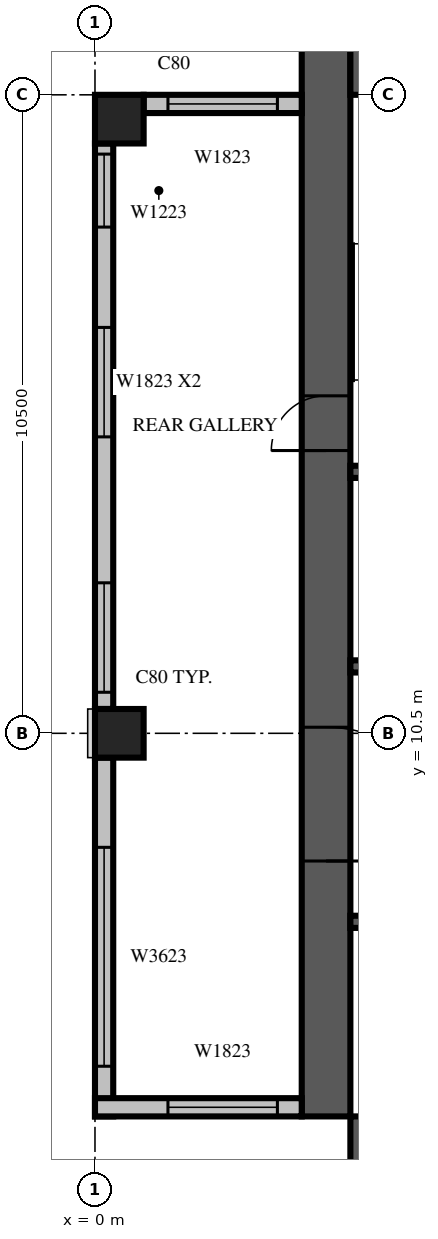
"""IFC4 building model, lengths in metres.
Left out: names, types, materials, properties, quantities, classifications, styles, units other than length and angle.
Written with IfcOpenShell. Run it as: python <this file> out.ifc"""

import sys

from ifc_helpers import new_model, si_unit, direction, frame, frame_2d, origin, origin_2d, place, context, subcontext, project, spatial, rectangle, extrude, source, transform, mapped, element, fill, save


model = new_model("IFC4")
c1 = context("Model", 3, precision=1e-05, world=origin(), true_north=direction((0.0, 1.0)))
c2 = subcontext(c1, "Body", "Model", "MODEL_VIEW")
j1 = project(units=[si_unit("LENGTHUNIT", "METRE"), si_unit("PLANEANGLEUNIT", "RADIAN")], contexts=[c1])
p1 = place(None, origin())
s1 = spatial("IfcSite", under=j1, at=p1, CompositionType="ELEMENT")
p2 = place(p1, origin())
s2 = spatial("IfcBuilding", under=s1, at=p2, CompositionType="ELEMENT")
p3 = place(p2, frame((0.0, 0.0, 257.6)))
s3 = spatial("IfcBuildingStorey", under=s2, at=p3, CompositionType="ELEMENT", Elevation=257.6)
m1 = source(origin(), c2, "Body", "SweptSolid", [
    extrude(rectangle(XDim=0.8, YDim=0.8, at=origin_2d()), origin(), (0.0, 0.0, 1.0), 3.8),
])
for number, where, z_axis, x_axis in (
    (1, (0.4, 10.5, 0.0), (0.0, 0.0, 1.0), (1.0, 0.0, 0.0)),
    (2, (0.4, 20.6, 0.0), (0.0, 0.0, 1.0), (1.0, 0.0, 0.0)),
):
    element("IfcColumn", number, at=place(p3, frame(where, z_axis=z_axis, x_axis=x_axis)), inside=s3, PredefinedType="COLUMN", context=c2, shape_type="MappedRepresentation", body=[
        mapped(m1, transform((0.0, 0.0, 0.0), scale=1.0)),
    ])
m2 = source(origin(), c2, "Body", "SweptSolid", [
    extrude(rectangle(XDim=17.6, YDim=0.8, at=frame_2d((8.8, 0.0))), origin(), (0.0, 0.0, 1.0), 3.8),
])
p4 = place(p3, frame((3.8, 4.2, 0.0), z_axis=(0.0, 0.0, 1.0), x_axis=(0.0, 1.0, 0.0)))
e3 = element("IfcWall", 3, at=p4, inside=s3, PredefinedType="SHEAR", context=c2, shape_type="MappedRepresentation", body=[
    mapped(m2, transform((0.0, 0.0, 0.0), scale=1.0)),
])
m3 = source(origin(), c2, "Body", "SweptSolid", [
    extrude(rectangle(XDim=2.2, YDim=2.1, at=frame_2d((1.1, 1.05))), frame((0.0, 0.41, 0.0), z_axis=(0.0, -1.0, 0.0), x_axis=(1.0, 0.0, 0.0)), (0.0, 0.0, 1.0), 0.82),
])
p5 = place(p4, frame((4.2, 0.0, 0.0)))
e4 = element("IfcOpeningElement", 4, at=p5, cuts=e3, PredefinedType="OPENING", context=c2, shape_type="MappedRepresentation", body=[
    mapped(m3, transform((0.0, 0.0, 0.0), scale=1.0)),
])
m4 = source(origin(), c2, "Body", "SweptSolid", [
    extrude(rectangle(XDim=0.9, YDim=2.1, at=frame_2d((0.45, 1.05))), frame((0.0, 0.41, 0.0), z_axis=(0.0, -1.0, 0.0), x_axis=(1.0, 0.0, 0.0)), (0.0, 0.0, 1.0), 0.82),
])
p6 = place(p4, frame((10.95, 0.0, 0.0)))
e5 = element("IfcOpeningElement", 5, at=p6, cuts=e3, PredefinedType="OPENING", context=c2, shape_type="MappedRepresentation", body=[
    mapped(m4, transform((0.0, 0.0, 0.0), scale=1.0)),
])
p7 = place(p3, frame((4.2, 3.8, 0.0), z_axis=(0.0, 0.0, 1.0), x_axis=(1.0, 0.0, 0.0)))
e6 = element("IfcWall", 6, at=p7, inside=s3, PredefinedType="SHEAR", context=c2, shape_type="MappedRepresentation", body=[
    mapped(m2, transform((0.0, 0.0, 0.0), scale=1.0)),
])
p8 = place(p7, frame((11.55, 0.0, 0.0)))
e7 = element("IfcOpeningElement", 7, at=p8, cuts=e6, PredefinedType="OPENING", context=c2, shape_type="MappedRepresentation", body=[
    mapped(m4, transform((0.0, 0.0, 0.0), scale=1.0)),
])
m5 = source(origin(), c2, "Body", "SweptSolid", [
    extrude(rectangle(XDim=16.8, YDim=0.8, at=frame_2d((8.4, 0.0))), origin(), (0.0, 0.0, 1.0), 3.8),
])
p9 = place(p3, frame((4.2, 21.4, 0.0), z_axis=(0.0, 0.0, 1.0), x_axis=(1.0, 0.0, 0.0)))
e8 = element("IfcWall", 8, at=p9, inside=s3, PredefinedType="SHEAR", context=c2, shape_type="MappedRepresentation", body=[
    mapped(m5, transform((0.0, 0.0, 0.0), scale=1.0)),
])
m6 = source(origin(), c2, "Body", "SweptSolid", [
    extrude(rectangle(XDim=1.2, YDim=2.1, at=frame_2d((0.6, 1.05))), frame((0.0, 0.41, 0.0), z_axis=(0.0, -1.0, 0.0), x_axis=(1.0, 0.0, 0.0)), (0.0, 0.0, 1.0), 0.82),
])
p10 = place(p9, frame((6.2, 0.0, 0.0)))
e9 = element("IfcOpeningElement", 9, at=p10, cuts=e8, PredefinedType="OPENING", context=c2, shape_type="MappedRepresentation", body=[
    mapped(m6, transform((0.0, 0.0, 0.0), scale=1.0)),
])
m7 = source(origin(), c2, "Body", "SweptSolid", [
    extrude(rectangle(XDim=2.6, YDim=0.3, at=frame_2d((1.3, 0.0))), origin(), (0.0, 0.0, 1.0), 3.4),
])
p11 = place(p3, frame((3.4, 20.85, 0.0), z_axis=(0.0, 0.0, 1.0), x_axis=(-1.0, 0.0, 0.0)))
e10 = element("IfcWall", 10, at=p11, inside=s3, PredefinedType="STANDARD", context=c2, shape_type="MappedRepresentation", body=[
    mapped(m7, transform((0.0, 0.0, 0.0), scale=1.0)),
])
m8 = source(origin(), c2, "Body", "SweptSolid", [
    extrude(rectangle(XDim=1.8, YDim=2.3, at=frame_2d((0.9, 1.15))), frame((0.0, 0.16, 0.0), z_axis=(0.0, -1.0, 0.0), x_axis=(1.0, 0.0, 0.0)), (0.0, 0.0, 1.0), 0.32),
])
p12 = place(p11, frame((0.4, 0.0, 0.6)))
e11 = element("IfcOpeningElement", 11, at=p12, cuts=e10, PredefinedType="OPENING", context=c2, shape_type="MappedRepresentation", body=[
    mapped(m8, transform((0.0, 0.0, 0.0), scale=1.0)),
])
m9 = source(origin(), c2, "Body", "SweptSolid", [
    extrude(rectangle(XDim=9.3, YDim=0.3, at=frame_2d((4.65, 0.0))), origin(), (0.0, 0.0, 1.0), 3.4),
])
p13 = place(p3, frame((0.15, 20.2, 0.0), z_axis=(0.0, 0.0, 1.0), x_axis=(0.0, -1.0, 0.0)))
e12 = element("IfcWall", 12, at=p13, inside=s3, PredefinedType="STANDARD", context=c2, shape_type="MappedRepresentation", body=[
    mapped(m9, transform((0.0, 0.0, 0.0), scale=1.0)),
])
m10 = source(origin(), c2, "Body", "SweptSolid", [
    extrude(rectangle(XDim=1.2, YDim=2.3, at=frame_2d((0.6, 1.15))), frame((0.0, 0.16, 0.0), z_axis=(0.0, -1.0, 0.0), x_axis=(1.0, 0.0, 0.0)), (0.0, 0.0, 1.0), 0.32),
])
p14 = place(p13, frame((0.175, 0.0, 0.6)))
e13 = element("IfcOpeningElement", 13, at=p14, cuts=e12, PredefinedType="OPENING", context=c2, shape_type="MappedRepresentation", body=[
    mapped(m10, transform((0.0, 0.0, 0.0), scale=1.0)),
])
p15 = place(p13, frame((3.025, 0.0, 0.6)))
e14 = element("IfcOpeningElement", 14, at=p15, cuts=e12, PredefinedType="OPENING", context=c2, shape_type="MappedRepresentation", body=[
    mapped(m8, transform((0.0, 0.0, 0.0), scale=1.0)),
])
p16 = place(p13, frame((7.225, 0.0, 0.6)))
e15 = element("IfcOpeningElement", 15, at=p16, cuts=e12, PredefinedType="OPENING", context=c2, shape_type="MappedRepresentation", body=[
    mapped(m8, transform((0.0, 0.0, 0.0), scale=1.0)),
])
m11 = source(origin(), c2, "Body", "SweptSolid", [
    extrude(rectangle(XDim=5.9, YDim=0.3, at=frame_2d((2.95, 0.0))), origin(), (0.0, 0.0, 1.0), 3.4),
])
p17 = place(p3, frame((0.15, 10.1, 0.0), z_axis=(0.0, 0.0, 1.0), x_axis=(0.0, -1.0, 0.0)))
e16 = element("IfcWall", 16, at=p17, inside=s3, PredefinedType="STANDARD", context=c2, shape_type="MappedRepresentation", body=[
    mapped(m11, transform((0.0, 0.0, 0.0), scale=1.0)),
])
m12 = source(origin(), c2, "Body", "SweptSolid", [
    extrude(rectangle(XDim=3.6, YDim=2.3, at=frame_2d((1.8, 1.15))), frame((0.0, 0.16, 0.0), z_axis=(0.0, -1.0, 0.0), x_axis=(1.0, 0.0, 0.0)), (0.0, 0.0, 1.0), 0.32),
])
p18 = place(p17, frame((1.475, 0.0, 0.6)))
e17 = element("IfcOpeningElement", 17, at=p18, cuts=e16, PredefinedType="OPENING", context=c2, shape_type="MappedRepresentation", body=[
    mapped(m12, transform((0.0, 0.0, 0.0), scale=1.0)),
])
m13 = source(origin(), c2, "Body", "SweptSolid", [
    extrude(rectangle(XDim=3.4, YDim=0.3, at=frame_2d((1.7, 0.0))), origin(), (0.0, 0.0, 1.0), 3.4),
])
p19 = place(p3, frame((0.0, 4.35, 0.0), z_axis=(0.0, 0.0, 1.0), x_axis=(1.0, 0.0, 0.0)))
e18 = element("IfcWall", 18, at=p19, inside=s3, PredefinedType="STANDARD", context=c2, shape_type="MappedRepresentation", body=[
    mapped(m13, transform((0.0, 0.0, 0.0), scale=1.0)),
])
p20 = place(p19, frame((1.2, 0.0, 0.6)))
e19 = element("IfcOpeningElement", 19, at=p20, cuts=e18, PredefinedType="OPENING", context=c2, shape_type="MappedRepresentation", body=[
    mapped(m8, transform((0.0, 0.0, 0.0), scale=1.0)),
])
m14 = source(origin(), c2, "Body", "SweptSolid", [
    extrude(rectangle(XDim=9.6, YDim=0.2, at=frame_2d((4.8, 0.0))), origin(), (0.0, 0.0, 1.0), 3.8),
])
p21 = place(p3, frame((4.2, 7.4, 0.0), z_axis=(0.0, 0.0, 1.0), x_axis=(1.0, 0.0, 0.0)))
e20 = element("IfcWall", 20, at=p21, inside=s3, PredefinedType="SOLIDWALL", context=c2, shape_type="MappedRepresentation", body=[
    mapped(m14, transform((0.0, 0.0, 0.0), scale=1.0)),
])
m15 = source(origin(), c2, "Body", "SweptSolid", [
    extrude(rectangle(XDim=1.1, YDim=2.1, at=frame_2d((0.55, 1.05))), frame((0.0, 0.11, 0.0), z_axis=(0.0, -1.0, 0.0), x_axis=(1.0, 0.0, 0.0)), (0.0, 0.0, 1.0), 0.22),
])
p22 = place(p21, frame((0.65, 0.0, 0.0)))
e21 = element("IfcOpeningElement", 21, at=p22, cuts=e20, PredefinedType="OPENING", context=c2, shape_type="MappedRepresentation", body=[
    mapped(m15, transform((0.0, 0.0, 0.0), scale=1.0)),
])
p23 = place(p21, frame((3.05, 0.0, 0.0)))
e22 = element("IfcOpeningElement", 22, at=p23, cuts=e20, PredefinedType="OPENING", context=c2, shape_type="MappedRepresentation", body=[
    mapped(m15, transform((0.0, 0.0, 0.0), scale=1.0)),
])
p24 = place(p21, frame((5.45, 0.0, 0.0)))
e23 = element("IfcOpeningElement", 23, at=p24, cuts=e20, PredefinedType="OPENING", context=c2, shape_type="MappedRepresentation", body=[
    mapped(m15, transform((0.0, 0.0, 0.0), scale=1.0)),
])
p25 = place(p21, frame((7.85, 0.0, 0.0)))
e24 = element("IfcOpeningElement", 24, at=p25, cuts=e20, PredefinedType="OPENING", context=c2, shape_type="MappedRepresentation", body=[
    mapped(m15, transform((0.0, 0.0, 0.0), scale=1.0)),
])
m16 = source(origin(), c2, "Body", "SweptSolid", [
    extrude(rectangle(XDim=4.8, YDim=0.2, at=frame_2d((2.4, 0.0))), origin(), (0.0, 0.0, 1.0), 3.8),
])
p26 = place(p3, frame((4.2, 11.6, 0.0), z_axis=(0.0, 0.0, 1.0), x_axis=(1.0, 0.0, 0.0)))
e25 = element("IfcWall", 25, at=p26, inside=s3, PredefinedType="SOLIDWALL", context=c2, shape_type="MappedRepresentation", body=[
    mapped(m16, transform((0.0, 0.0, 0.0), scale=1.0)),
])
p27 = place(p26, frame((0.65, 0.0, 0.0)))
e26 = element("IfcOpeningElement", 26, at=p27, cuts=e25, PredefinedType="OPENING", context=c2, shape_type="MappedRepresentation", body=[
    mapped(m15, transform((0.0, 0.0, 0.0), scale=1.0)),
])
p28 = place(p26, frame((3.05, 0.0, 0.0)))
e27 = element("IfcOpeningElement", 27, at=p28, cuts=e25, PredefinedType="OPENING", context=c2, shape_type="MappedRepresentation", body=[
    mapped(m15, transform((0.0, 0.0, 0.0), scale=1.0)),
])
p29 = place(p3, frame((4.2, 14.8, 0.0), z_axis=(0.0, 0.0, 1.0), x_axis=(1.0, 0.0, 0.0)))
e28 = element("IfcWall", 28, at=p29, inside=s3, PredefinedType="SOLIDWALL", context=c2, shape_type="MappedRepresentation", body=[
    mapped(m16, transform((0.0, 0.0, 0.0), scale=1.0)),
])
m17 = source(origin(), c2, "Body", "SweptSolid", [
    extrude(rectangle(XDim=1.8, YDim=2.3, at=frame_2d((0.9, 1.15))), frame((0.0, 0.03, 0.0), z_axis=(0.0, -1.0, 0.0), x_axis=(1.0, 0.0, 0.0)), (0.0, 0.0, 1.0), 0.06),
])
p30 = place(p12, origin())
e29 = element("IfcWindow", 29, at=p30, inside=s3, PartitioningType="SINGLE_PANEL", PredefinedType="WINDOW", context=c2, shape_type="MappedRepresentation", body=[
    mapped(m17, transform((0.0, 0.0, 0.0), scale=1.0)),
])
fill(e11, e29)
m18 = source(origin(), c2, "Body", "SweptSolid", [
    extrude(rectangle(XDim=1.2, YDim=2.3, at=frame_2d((0.6, 1.15))), frame((0.0, 0.03, 0.0), z_axis=(0.0, -1.0, 0.0), x_axis=(1.0, 0.0, 0.0)), (0.0, 0.0, 1.0), 0.06),
])
p31 = place(p14, origin())
e30 = element("IfcWindow", 30, at=p31, inside=s3, PartitioningType="SINGLE_PANEL", PredefinedType="WINDOW", context=c2, shape_type="MappedRepresentation", body=[
    mapped(m18, transform((0.0, 0.0, 0.0), scale=1.0)),
])
fill(e13, e30)
p32 = place(p15, origin())
e31 = element("IfcWindow", 31, at=p32, inside=s3, PartitioningType="SINGLE_PANEL", PredefinedType="WINDOW", context=c2, shape_type="MappedRepresentation", body=[
    mapped(m17, transform((0.0, 0.0, 0.0), scale=1.0)),
])
fill(e14, e31)
p33 = place(p16, origin())
e32 = element("IfcWindow", 32, at=p33, inside=s3, PartitioningType="SINGLE_PANEL", PredefinedType="WINDOW", context=c2, shape_type="MappedRepresentation", body=[
    mapped(m17, transform((0.0, 0.0, 0.0), scale=1.0)),
])
fill(e15, e32)
m19 = source(origin(), c2, "Body", "SweptSolid", [
    extrude(rectangle(XDim=3.6, YDim=2.3, at=frame_2d((1.8, 1.15))), frame((0.0, 0.03, 0.0), z_axis=(0.0, -1.0, 0.0), x_axis=(1.0, 0.0, 0.0)), (0.0, 0.0, 1.0), 0.06),
])
p34 = place(p18, origin())
e33 = element("IfcWindow", 33, at=p34, inside=s3, PartitioningType="SINGLE_PANEL", PredefinedType="WINDOW", context=c2, shape_type="MappedRepresentation", body=[
    mapped(m19, transform((0.0, 0.0, 0.0), scale=1.0)),
])
fill(e17, e33)
p35 = place(p20, origin())
e34 = element("IfcWindow", 34, at=p35, inside=s3, PartitioningType="SINGLE_PANEL", PredefinedType="WINDOW", context=c2, shape_type="MappedRepresentation", body=[
    mapped(m17, transform((0.0, 0.0, 0.0), scale=1.0)),
])
fill(e19, e34)
m20 = source(origin(), c2, "Body", "SweptSolid", [
    extrude(rectangle(XDim=2.2, YDim=2.1, at=frame_2d((1.1, 1.05))), frame((0.0, 0.025, 0.0), z_axis=(0.0, -1.0, 0.0), x_axis=(1.0, 0.0, 0.0)), (0.0, 0.0, 1.0), 0.05),
])
p36 = place(p5, origin())
e35 = element("IfcDoor", 35, at=p36, inside=s3, OperationType="DOUBLE_DOOR_SINGLE_SWING", PredefinedType="DOOR", context=c2, shape_type="MappedRepresentation", body=[
    mapped(m20, transform((0.0, 0.0, 0.0), scale=1.0)),
])
fill(e4, e35)
m21 = source(origin(), c2, "Body", "SweptSolid", [
    extrude(rectangle(XDim=0.9, YDim=2.1, at=frame_2d((0.45, 1.05))), frame((0.0, 0.025, 0.0), z_axis=(0.0, -1.0, 0.0), x_axis=(1.0, 0.0, 0.0)), (0.0, 0.0, 1.0), 0.05),
])
p37 = place(p6, origin())
e36 = element("IfcDoor", 36, at=p37, inside=s3, OperationType="SINGLE_SWING_LEFT", PredefinedType="DOOR", context=c2, shape_type="MappedRepresentation", body=[
    mapped(m21, transform((0.0, 0.0, 0.0), scale=1.0)),
])
fill(e5, e36)
save(model, sys.argv[1])
